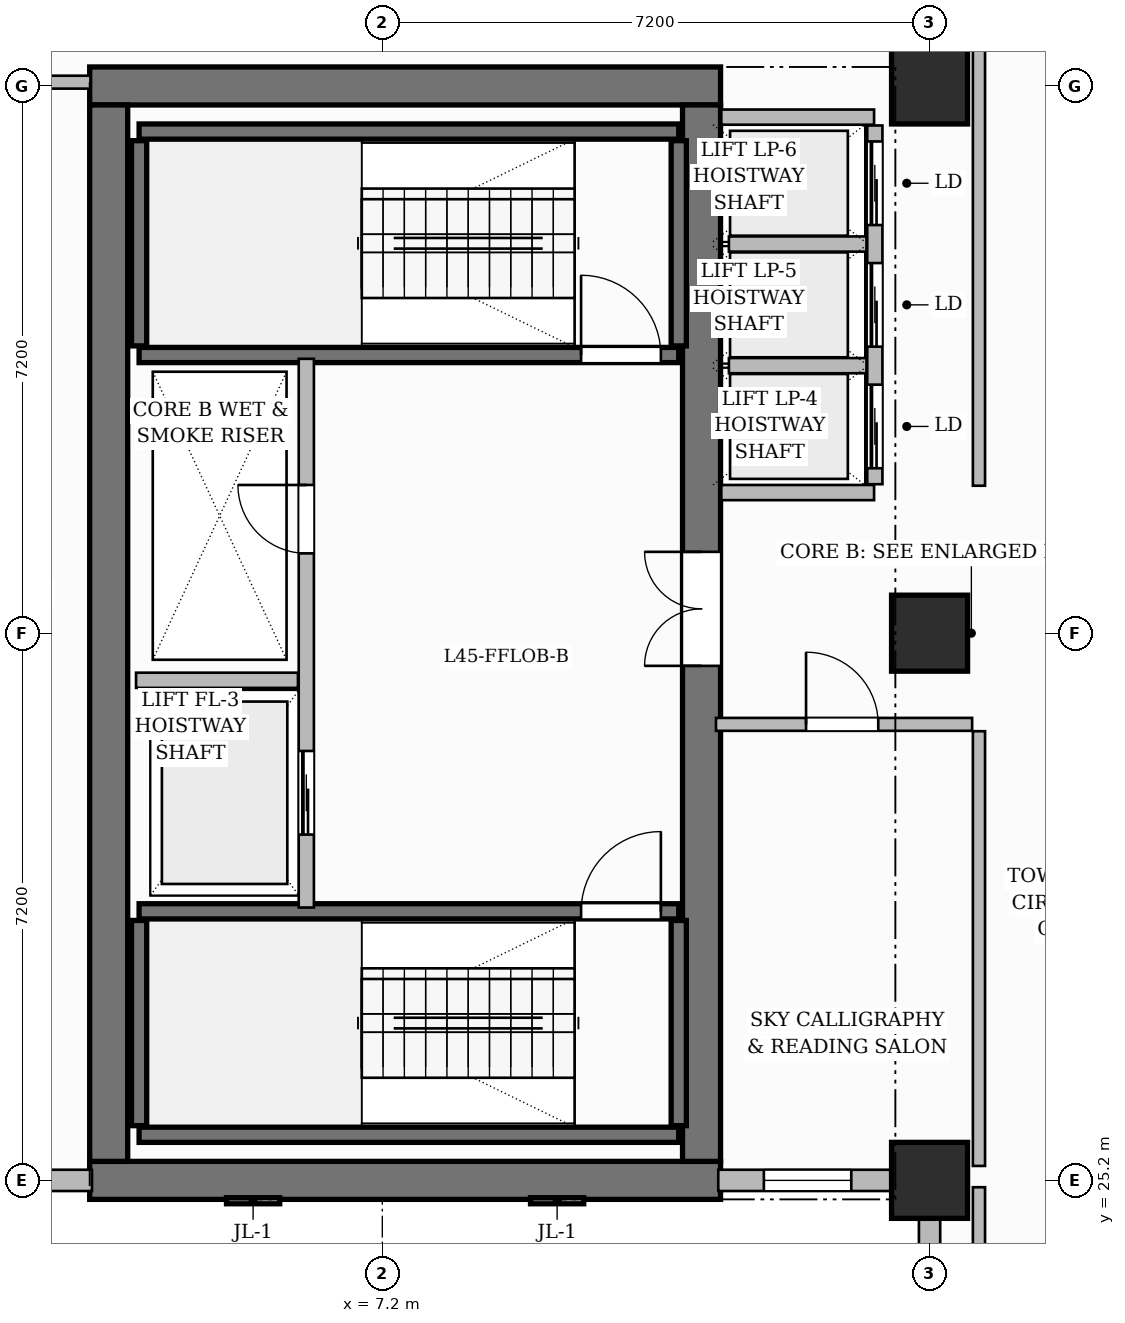
"""IFC4 building model, lengths in metres.
Left out: names, types, materials, properties, quantities, classifications, styles, units other than length and angle.
Written with IfcOpenShell. Run it as: python <this file> out.ifc"""

import sys

from ifc_helpers import new_model, si_unit, direction, frame, frame_2d, origin, origin_2d, place, context, subcontext, project, spatial, rectangle, extrude, source, transform, mapped, element, fill, save


model = new_model("IFC4")
c1 = context("Model", 3, precision=1e-05, world=origin(), true_north=direction((0.0, 1.0)))
c2 = subcontext(c1, "Body", "Model", "MODEL_VIEW")
j1 = project(units=[si_unit("LENGTHUNIT", "METRE"), si_unit("PLANEANGLEUNIT", "RADIAN")], contexts=[c1])
p1 = place(None, origin())
s1 = spatial("IfcSite", under=j1, at=p1, CompositionType="ELEMENT")
p2 = place(p1, origin())
s2 = spatial("IfcBuilding", under=s1, at=p2, CompositionType="ELEMENT")
p3 = place(p2, frame((0.0, 0.0, 181.1)))
s3 = spatial("IfcBuildingStorey", under=s2, at=p3, CompositionType="ELEMENT", Elevation=181.1)
for number, where, z_axis, x_axis in (
    (1, (3.35, 25.2, 0.0), (0.0, 0.0, 1.0), (1.0, 0.0, 0.0)),
    (2, (3.35, 39.6, 0.0), (0.0, 0.0, 1.0), (1.0, 0.0, 0.0)),
):
    element("IfcWall", number, at=place(p3, frame(where, z_axis=z_axis, x_axis=x_axis)), inside=s3, PredefinedType="SHEAR", context=c2, shape_type="SweptSolid", body=[
        extrude(rectangle(XDim=8.3, YDim=0.5, at=frame_2d((4.15, 0.0))), origin(), (0.0, 0.0, 1.0), 3.85),
    ])
p4 = place(p3, frame((3.6, 25.45, 0.0), z_axis=(0.0, 0.0, 1.0), x_axis=(0.0, 1.0, 0.0)))
e3 = element("IfcWall", 3, at=p4, inside=s3, PredefinedType="SHEAR", context=c2, shape_type="SweptSolid", body=[
    extrude(rectangle(XDim=13.9, YDim=0.5, at=frame_2d((6.95, 0.0))), origin(), (0.0, 0.0, 1.0), 3.85),
])
p5 = place(p3, frame((11.4, 25.45, 0.0), z_axis=(0.0, 0.0, 1.0), x_axis=(0.0, 1.0, 0.0)))
e4 = element("IfcWall", 4, at=p5, inside=s3, PredefinedType="SHEAR", context=c2, shape_type="SweptSolid", body=[
    extrude(rectangle(XDim=13.9, YDim=0.5, at=frame_2d((6.95, 0.0))), origin(), (0.0, 0.0, 1.0), 3.85),
])
p6 = place(p5, frame((6.52, 0.0, 0.0)))
e5 = element("IfcOpeningElement", 5, at=p6, cuts=e4, PredefinedType="OPENING", context=c2, shape_type="SweptSolid", body=[
    extrude(rectangle(XDim=1.5, YDim=2.2, at=frame_2d((0.75, 1.1))), frame((0.0, 0.26, 0.0), z_axis=(0.0, -1.0, 0.0), x_axis=(1.0, 0.0, 0.0)), (0.0, 0.0, 1.0), 0.52),
])
m1 = source(origin(), c2, "Body", "SweptSolid", [
    extrude(rectangle(XDim=1.0, YDim=1.0, at=origin_2d()), origin(), (0.0, 0.0, 1.0), 3.85),
])
for number, where, z_axis, x_axis in (
    (6, (14.4, 25.2, 0.0), (0.0, 0.0, 1.0), (1.0, 0.0, 0.0)),
    (7, (14.4, 32.4, 0.0), (0.0, 0.0, 1.0), (1.0, 0.0, 0.0)),
    (8, (14.4, 39.6, 0.0), (0.0, 0.0, 1.0), (1.0, 0.0, 0.0)),
):
    element("IfcColumn", number, at=place(p3, frame(where, z_axis=z_axis, x_axis=x_axis)), inside=s3, PredefinedType="COLUMN", context=c2, shape_type="MappedRepresentation", body=[
        mapped(m1, transform((0.0, 0.0, 0.0), scale=1.0)),
    ])
p7 = place(p3, frame((4.0, 25.8, 0.0), z_axis=(0.0, 0.0, 1.0), x_axis=(1.0, 0.0, 0.0)))
e9 = element("IfcWall", 9, at=p7, inside=s3, PredefinedType="SHEAR", context=c2, shape_type="SweptSolid", body=[
    extrude(rectangle(XDim=7.1, YDim=0.2, at=frame_2d((3.55, 0.0))), origin(), (0.0, 0.0, 1.0), 3.85),
])
for number, where, z_axis, x_axis in (
    (10, (4.0, 25.92, 0.0), (0.0, 0.0, 1.0), (0.0, 1.0, 0.0)),
    (11, (11.1, 25.92, 0.0), (0.0, 0.0, 1.0), (0.0, 1.0, 0.0)),
):
    element("IfcWall", number, at=place(p3, frame(where, z_axis=z_axis, x_axis=x_axis)), inside=s3, PredefinedType="SHEAR", context=c2, shape_type="SweptSolid", body=[
        extrude(rectangle(XDim=2.7, YDim=0.2, at=frame_2d((1.35, 0.0))), origin(), (0.0, 0.0, 1.0), 3.85),
    ])
p8 = place(p3, frame((4.0, 28.74, 0.0), z_axis=(0.0, 0.0, 1.0), x_axis=(1.0, 0.0, 0.0)))
e12 = element("IfcWall", 12, at=p8, inside=s3, PredefinedType="SHEAR", context=c2, shape_type="SweptSolid", body=[
    extrude(rectangle(XDim=7.1, YDim=0.2, at=frame_2d((3.55, 0.0))), origin(), (0.0, 0.0, 1.0), 3.85),
])
p9 = place(p8, frame((5.815, 0.0, 0.0)))
e13 = element("IfcOpeningElement", 13, at=p9, cuts=e12, PredefinedType="OPENING", context=c2, shape_type="SweptSolid", body=[
    extrude(rectangle(XDim=1.05, YDim=2.2, at=frame_2d((0.525, 1.1))), frame((0.0, 0.11, 0.0), z_axis=(0.0, -1.0, 0.0), x_axis=(1.0, 0.0, 0.0)), (0.0, 0.0, 1.0), 0.22),
])
p10 = place(p3, frame((4.0, 39.0, 0.0), z_axis=(0.0, 0.0, 1.0), x_axis=(1.0, 0.0, 0.0)))
e14 = element("IfcWall", 14, at=p10, inside=s3, PredefinedType="SHEAR", context=c2, shape_type="SweptSolid", body=[
    extrude(rectangle(XDim=7.1, YDim=0.2, at=frame_2d((3.55, 0.0))), origin(), (0.0, 0.0, 1.0), 3.85),
])
for number, where, z_axis, x_axis in (
    (15, (4.0, 36.18, 0.0), (0.0, 0.0, 1.0), (0.0, 1.0, 0.0)),
    (16, (11.1, 36.18, 0.0), (0.0, 0.0, 1.0), (0.0, 1.0, 0.0)),
):
    element("IfcWall", number, at=place(p3, frame(where, z_axis=z_axis, x_axis=x_axis)), inside=s3, PredefinedType="SHEAR", context=c2, shape_type="SweptSolid", body=[
        extrude(rectangle(XDim=2.7, YDim=0.2, at=frame_2d((1.35, 0.0))), origin(), (0.0, 0.0, 1.0), 3.85),
    ])
p11 = place(p3, frame((4.0, 36.06, 0.0), z_axis=(0.0, 0.0, 1.0), x_axis=(1.0, 0.0, 0.0)))
e17 = element("IfcWall", 17, at=p11, inside=s3, PredefinedType="SHEAR", context=c2, shape_type="SweptSolid", body=[
    extrude(rectangle(XDim=7.1, YDim=0.2, at=frame_2d((3.55, 0.0))), origin(), (0.0, 0.0, 1.0), 3.85),
])
p12 = place(p11, frame((5.815, 0.0, 0.0)))
e18 = element("IfcOpeningElement", 18, at=p12, cuts=e17, PredefinedType="OPENING", context=c2, shape_type="SweptSolid", body=[
    extrude(rectangle(XDim=1.05, YDim=2.2, at=frame_2d((0.525, 1.1))), frame((0.0, 0.11, 0.0), z_axis=(0.0, -1.0, 0.0), x_axis=(1.0, 0.0, 0.0)), (0.0, 0.0, 1.0), 0.22),
])
p13 = place(p3, frame((6.2, 28.79, 0.0), z_axis=(0.0, 0.0, 1.0), x_axis=(0.0, 1.0, 0.0)))
e19 = element("IfcWall", 19, at=p13, inside=s3, PredefinedType="PARTITIONING", context=c2, shape_type="SweptSolid", body=[
    extrude(rectangle(XDim=7.22, YDim=0.2, at=frame_2d((3.61, 0.0))), origin(), (0.0, 0.0, 1.0), 3.6),
])
p14 = place(p13, frame((4.66, 0.0, 0.0)))
e20 = element("IfcOpeningElement", 20, at=p14, cuts=e19, PredefinedType="OPENING", context=c2, shape_type="SweptSolid", body=[
    extrude(rectangle(XDim=0.9, YDim=2.1, at=frame_2d((0.45, 1.05))), frame((0.0, 0.11, 0.0), z_axis=(0.0, -1.0, 0.0), x_axis=(1.0, 0.0, 0.0)), (0.0, 0.0, 1.0), 0.22),
])
p15 = place(p13, frame((0.96, 0.0, 0.0)))
e21 = element("IfcOpeningElement", 21, at=p15, cuts=e19, PredefinedType="OPENING", context=c2, shape_type="SweptSolid", body=[
    extrude(rectangle(XDim=1.1, YDim=2.2, at=frame_2d((0.55, 1.1))), frame((0.0, 0.11, 0.0), z_axis=(0.0, -1.0, 0.0), x_axis=(1.0, 0.0, 0.0)), (0.0, 0.0, 1.0), 0.22),
])
p16 = place(p3, frame((3.96, 31.78, 0.0), z_axis=(0.0, 0.0, 1.0), x_axis=(1.0, 0.0, 0.0)))
e22 = element("IfcWall", 22, at=p16, inside=s3, PredefinedType="PARTITIONING", context=c2, shape_type="SweptSolid", body=[
    extrude(rectangle(XDim=2.13, YDim=0.2, at=frame_2d((1.065, 0.0))), origin(), (0.0, 0.0, 1.0), 3.6),
])
for number, where, z_axis, x_axis in (
    (23, (11.66, 34.25, 0.0), (0.0, 0.0, 1.0), (1.0, 0.0, 0.0)),
    (24, (11.66, 39.19, 0.0), (0.0, 0.0, 1.0), (1.0, 0.0, 0.0)),
):
    element("IfcWall", number, at=place(p3, frame(where, z_axis=z_axis, x_axis=x_axis)), inside=s3, PredefinedType="PARTITIONING", context=c2, shape_type="SweptSolid", body=[
        extrude(rectangle(XDim=2.01, YDim=0.2, at=frame_2d((1.005, 0.0))), origin(), (0.0, 0.0, 1.0), 3.6),
    ])
p17 = place(p3, frame((13.68, 34.36, 0.0), z_axis=(0.0, 0.0, 1.0), x_axis=(0.0, 1.0, 0.0)))
e25 = element("IfcWall", 25, at=p17, inside=s3, PredefinedType="PARTITIONING", context=c2, shape_type="SweptSolid", body=[
    extrude(rectangle(XDim=4.72, YDim=0.2, at=frame_2d((2.36, 0.0))), origin(), (0.0, 0.0, 1.0), 3.6),
])
p18 = place(p17, frame((0.21, 0.0, 0.0)))
e26 = element("IfcOpeningElement", 26, at=p18, cuts=e25, PredefinedType="OPENING", context=c2, shape_type="SweptSolid", body=[
    extrude(rectangle(XDim=1.1, YDim=2.2, at=frame_2d((0.55, 1.1))), frame((0.0, 0.11, 0.0), z_axis=(0.0, -1.0, 0.0), x_axis=(1.0, 0.0, 0.0)), (0.0, 0.0, 1.0), 0.22),
])
p19 = place(p17, frame((1.81, 0.0, 0.0)))
e27 = element("IfcOpeningElement", 27, at=p19, cuts=e25, PredefinedType="OPENING", context=c2, shape_type="SweptSolid", body=[
    extrude(rectangle(XDim=1.1, YDim=2.2, at=frame_2d((0.55, 1.1))), frame((0.0, 0.11, 0.0), z_axis=(0.0, -1.0, 0.0), x_axis=(1.0, 0.0, 0.0)), (0.0, 0.0, 1.0), 0.22),
])
p20 = place(p17, frame((3.41, 0.0, 0.0)))
e28 = element("IfcOpeningElement", 28, at=p20, cuts=e25, PredefinedType="OPENING", context=c2, shape_type="SweptSolid", body=[
    extrude(rectangle(XDim=1.1, YDim=2.2, at=frame_2d((0.55, 1.1))), frame((0.0, 0.11, 0.0), z_axis=(0.0, -1.0, 0.0), x_axis=(1.0, 0.0, 0.0)), (0.0, 0.0, 1.0), 0.22),
])
for number, where, z_axis, x_axis in (
    (29, (11.76, 35.92, 0.0), (0.0, 0.0, 1.0), (1.0, 0.0, 0.0)),
    (30, (11.76, 37.52, 0.0), (0.0, 0.0, 1.0), (1.0, 0.0, 0.0)),
):
    element("IfcWall", number, at=place(p3, frame(where, z_axis=z_axis, x_axis=x_axis)), inside=s3, PredefinedType="PARTITIONING", context=c2, shape_type="SweptSolid", body=[
        extrude(rectangle(XDim=1.81, YDim=0.2, at=frame_2d((0.905, 0.0))), origin(), (0.0, 0.0, 1.0), 3.6),
    ])
p21 = place(p3, frame((15.05, 12.36, 0.0), z_axis=(0.0, 0.0, 1.0), x_axis=(0.0, 1.0, 0.0)))
e31 = element("IfcWall", 31, at=p21, inside=s3, PredefinedType="PARTITIONING", context=c2, shape_type="SweptSolid", body=[
    extrude(rectangle(XDim=12.75, YDim=0.16, at=frame_2d((6.375, 0.0))), origin(), (0.0, 0.0, 1.0), 3.6),
])
p22 = place(p3, frame((0.24, 39.65, 0.0), z_axis=(0.0, 0.0, 1.0), x_axis=(1.0, 0.0, 0.0)))
e32 = element("IfcWall", 32, at=p22, inside=s3, PredefinedType="PARTITIONING", context=c2, shape_type="SweptSolid", body=[
    extrude(rectangle(XDim=3.12, YDim=0.17, at=frame_2d((1.56, 0.0))), origin(), (0.0, 0.0, 1.0), 3.6),
])
p23 = place(p22, frame((1.11, 0.0, 0.0)))
e33 = element("IfcOpeningElement", 33, at=p23, cuts=e32, PredefinedType="OPENING", context=c2, shape_type="SweptSolid", body=[
    extrude(rectangle(XDim=0.9, YDim=2.15, at=frame_2d((0.45, 1.075))), frame((0.0, 0.095, 0.0), z_axis=(0.0, -1.0, 0.0), x_axis=(1.0, 0.0, 0.0)), (0.0, 0.0, 1.0), 0.19),
])
p24 = place(p3, frame((15.05, 34.34, 0.0), z_axis=(0.0, 0.0, 1.0), x_axis=(0.0, 1.0, 0.0)))
e34 = element("IfcWall", 34, at=p24, inside=s3, PredefinedType="PARTITIONING", context=c2, shape_type="SweptSolid", body=[
    extrude(rectangle(XDim=12.312, YDim=0.16, at=frame_2d((6.156, 0.0))), origin(), (0.0, 0.0, 1.0), 3.6),
])
p25 = place(p24, frame((8.01, 0.0, 0.0)))
e35 = element("IfcOpeningElement", 35, at=p25, cuts=e34, PredefinedType="OPENING", context=c2, shape_type="SweptSolid", body=[
    extrude(rectangle(XDim=1.6, YDim=2.4, at=frame_2d((0.8, 1.2))), frame((0.0, 0.09, 0.0), z_axis=(0.0, -1.0, 0.0), x_axis=(1.0, 0.0, 0.0)), (0.0, 0.0, 1.0), 0.18),
])
p26 = place(p3, frame((15.05, 25.39, 0.0), z_axis=(0.0, 0.0, 1.0), x_axis=(0.0, 1.0, 0.0)))
e36 = element("IfcWall", 36, at=p26, inside=s3, PredefinedType="PARTITIONING", context=c2, shape_type="SweptSolid", body=[
    extrude(rectangle(XDim=5.72, YDim=0.16, at=frame_2d((2.86, 0.0))), origin(), (0.0, 0.0, 1.0), 3.6),
])
p27 = place(p3, frame((11.59, 31.2, 0.0), z_axis=(0.0, 0.0, 1.0), x_axis=(1.0, 0.0, 0.0)))
e37 = element("IfcWall", 37, at=p27, inside=s3, PredefinedType="PARTITIONING", context=c2, shape_type="SweptSolid", body=[
    extrude(rectangle(XDim=3.37, YDim=0.17, at=frame_2d((1.685, 0.0))), origin(), (0.0, 0.0, 1.0), 3.6),
])
p28 = place(p27, frame((1.185, 0.0, 0.0)))
e38 = element("IfcOpeningElement", 38, at=p28, cuts=e37, PredefinedType="OPENING", context=c2, shape_type="SweptSolid", body=[
    extrude(rectangle(XDim=0.95, YDim=2.15, at=frame_2d((0.475, 1.075))), frame((0.0, 0.095, 0.0), z_axis=(0.0, -1.0, 0.0), x_axis=(1.0, 0.0, 0.0)), (0.0, 0.0, 1.0), 0.19),
])
p29 = place(p3, frame((14.4, 0.05, 0.0), z_axis=(0.0, 0.0, 1.0), x_axis=(0.0, 1.0, 0.0)))
e39 = element("IfcWall", 39, at=p29, inside=s3, PredefinedType="SOLIDWALL", context=c2, shape_type="SweptSolid", body=[
    extrude(rectangle(XDim=25.1, YDim=0.28, at=frame_2d((12.55, 0.0))), origin(), (0.0, 0.0, 1.0), 3.085),
])
p30 = place(p29, frame((2.75, 0.0, 0.0)))
e40 = element("IfcOpeningElement", 40, at=p30, cuts=e39, PredefinedType="OPENING", context=c2, shape_type="SweptSolid", body=[
    extrude(rectangle(XDim=1.2, YDim=2.2, at=frame_2d((0.6, 1.1))), frame((0.0, 0.15, 0.0), z_axis=(0.0, -1.0, 0.0), x_axis=(1.0, 0.0, 0.0)), (0.0, 0.0, 1.0), 0.3),
])
p31 = place(p29, frame((1.025, 0.0, 0.8)))
e41 = element("IfcOpeningElement", 41, at=p31, cuts=e39, PredefinedType="OPENING", context=c2, shape_type="SweptSolid", body=[
    extrude(rectangle(XDim=1.15, YDim=1.8, at=frame_2d((0.575, 0.9))), frame((0.0, 0.15, 0.0), z_axis=(0.0, -1.0, 0.0), x_axis=(1.0, 0.0, 0.0)), (0.0, 0.0, 1.0), 0.3),
])
p32 = place(p29, frame((4.6, 0.0, 0.8)))
e42 = element("IfcOpeningElement", 42, at=p32, cuts=e39, PredefinedType="OPENING", context=c2, shape_type="SweptSolid", body=[
    extrude(rectangle(XDim=1.4, YDim=1.85, at=frame_2d((0.7, 0.925))), frame((0.0, 0.15, 0.0), z_axis=(0.0, -1.0, 0.0), x_axis=(1.0, 0.0, 0.0)), (0.0, 0.0, 1.0), 0.3),
])
p33 = place(p29, frame((8.421, 0.0, 0.8)))
e43 = element("IfcOpeningElement", 43, at=p33, cuts=e39, PredefinedType="OPENING", context=c2, shape_type="SweptSolid", body=[
    extrude(rectangle(XDim=1.4, YDim=1.85, at=frame_2d((0.7, 0.925))), frame((0.0, 0.15, 0.0), z_axis=(0.0, -1.0, 0.0), x_axis=(1.0, 0.0, 0.0)), (0.0, 0.0, 1.0), 0.3),
])
p34 = place(p29, frame((10.685, 0.0, 0.8)))
e44 = element("IfcOpeningElement", 44, at=p34, cuts=e39, PredefinedType="OPENING", context=c2, shape_type="SweptSolid", body=[
    extrude(rectangle(XDim=1.15, YDim=1.8, at=frame_2d((0.575, 0.9))), frame((0.0, 0.15, 0.0), z_axis=(0.0, -1.0, 0.0), x_axis=(1.0, 0.0, 0.0)), (0.0, 0.0, 1.0), 0.3),
])
p35 = place(p29, frame((12.414, 0.0, 0.8)))
e45 = element("IfcOpeningElement", 45, at=p35, cuts=e39, PredefinedType="OPENING", context=c2, shape_type="SweptSolid", body=[
    extrude(rectangle(XDim=0.95, YDim=1.75, at=frame_2d((0.475, 0.875))), frame((0.0, 0.15, 0.0), z_axis=(0.0, -1.0, 0.0), x_axis=(1.0, 0.0, 0.0)), (0.0, 0.0, 1.0), 0.3),
])
p36 = place(p29, frame((15.675, 0.0, 0.8)))
e46 = element("IfcOpeningElement", 46, at=p36, cuts=e39, PredefinedType="OPENING", context=c2, shape_type="SweptSolid", body=[
    extrude(rectangle(XDim=1.8, YDim=1.85, at=frame_2d((0.9, 0.925))), frame((0.0, 0.15, 0.0), z_axis=(0.0, -1.0, 0.0), x_axis=(1.0, 0.0, 0.0)), (0.0, 0.0, 1.0), 0.3),
])
p37 = place(p29, frame((18.425, 0.0, 0.8)))
e47 = element("IfcOpeningElement", 47, at=p37, cuts=e39, PredefinedType="OPENING", context=c2, shape_type="SweptSolid", body=[
    extrude(rectangle(XDim=1.8, YDim=1.85, at=frame_2d((0.9, 0.925))), frame((0.0, 0.15, 0.0), z_axis=(0.0, -1.0, 0.0), x_axis=(1.0, 0.0, 0.0)), (0.0, 0.0, 1.0), 0.3),
])
p38 = place(p29, frame((22.65, 0.0, 0.8)))
e48 = element("IfcOpeningElement", 48, at=p38, cuts=e39, PredefinedType="OPENING", context=c2, shape_type="SweptSolid", body=[
    extrude(rectangle(XDim=1.4, YDim=1.85, at=frame_2d((0.7, 0.925))), frame((0.0, 0.15, 0.0), z_axis=(0.0, -1.0, 0.0), x_axis=(1.0, 0.0, 0.0)), (0.0, 0.0, 1.0), 0.3),
])
p39 = place(p3, frame((11.62, 25.2, 0.0), z_axis=(0.0, 0.0, 1.0), x_axis=(1.0, 0.0, 0.0)))
e49 = element("IfcWall", 49, at=p39, inside=s3, PredefinedType="SOLIDWALL", context=c2, shape_type="SweptSolid", body=[
    extrude(rectangle(XDim=2.78, YDim=0.28, at=frame_2d((1.39, 0.0))), origin(), (0.0, 0.0, 1.0), 3.085),
])
p40 = place(p39, frame((0.6, 0.0, 0.8)))
e50 = element("IfcOpeningElement", 50, at=p40, cuts=e49, PredefinedType="OPENING", context=c2, shape_type="SweptSolid", body=[
    extrude(rectangle(XDim=1.15, YDim=1.8, at=frame_2d((0.575, 0.9))), frame((0.0, 0.15, 0.0), z_axis=(0.0, -1.0, 0.0), x_axis=(1.0, 0.0, 0.0)), (0.0, 0.0, 1.0), 0.3),
])
p41 = place(p3, frame((0.0, 25.2, 0.0), z_axis=(0.0, 0.0, 1.0), x_axis=(1.0, 0.0, 0.0)))
e51 = element("IfcWall", 51, at=p41, inside=s3, PredefinedType="SOLIDWALL", context=c2, shape_type="SweptSolid", body=[
    extrude(rectangle(XDim=3.38, YDim=0.28, at=frame_2d((1.69, 0.0))), origin(), (0.0, 0.0, 1.0), 3.6),
])
p42 = place(p41, frame((1.205, 0.0, 0.8)))
e52 = element("IfcOpeningElement", 52, at=p42, cuts=e51, PredefinedType="OPENING", context=c2, shape_type="SweptSolid", body=[
    extrude(rectangle(XDim=1.4, YDim=1.85, at=frame_2d((0.7, 0.925))), frame((0.0, 0.15, 0.0), z_axis=(0.0, -1.0, 0.0), x_axis=(1.0, 0.0, 0.0)), (0.0, 0.0, 1.0), 0.3),
])
m2 = source(origin(), c2, "Body", "SweptSolid", [
    extrude(rectangle(XDim=1.05, YDim=2.2, at=frame_2d((0.525, 1.1))), frame((0.0, 0.025, 0.0), z_axis=(0.0, -1.0, 0.0), x_axis=(1.0, 0.0, 0.0)), (0.0, 0.0, 1.0), 0.05),
])
p43 = place(p9, origin())
e53 = element("IfcDoor", 53, at=p43, inside=s3, OperationType="SINGLE_SWING_RIGHT", PredefinedType="DOOR", context=c2, shape_type="MappedRepresentation", body=[
    mapped(m2, transform((0.0, 0.0, 0.0), scale=1.0)),
])
fill(e13, e53)
p44 = place(p12, origin())
e54 = element("IfcDoor", 54, at=p44, inside=s3, OperationType="SINGLE_SWING_LEFT", PredefinedType="DOOR", context=c2, shape_type="MappedRepresentation", body=[
    mapped(m2, transform((0.0, 0.0, 0.0), scale=1.0)),
])
fill(e18, e54)
m3 = source(origin(), c2, "Body", "SweptSolid", [
    extrude(rectangle(XDim=0.9, YDim=2.1, at=frame_2d((0.45, 1.05))), frame((0.0, 0.025, 0.0), z_axis=(0.0, -1.0, 0.0), x_axis=(1.0, 0.0, 0.0)), (0.0, 0.0, 1.0), 0.05),
])
p45 = place(p14, origin())
e55 = element("IfcDoor", 55, at=p45, inside=s3, OperationType="SINGLE_SWING_RIGHT", PredefinedType="DOOR", context=c2, shape_type="MappedRepresentation", body=[
    mapped(m3, transform((0.0, 0.0, 0.0), scale=1.0)),
])
fill(e20, e55)
m4 = source(origin(), c2, "Body", "SweptSolid", [
    extrude(rectangle(XDim=1.5, YDim=2.2, at=frame_2d((0.75, 1.1))), frame((0.0, 0.025, 0.0), z_axis=(0.0, -1.0, 0.0), x_axis=(1.0, 0.0, 0.0)), (0.0, 0.0, 1.0), 0.05),
])
p46 = place(p6, origin())
e56 = element("IfcDoor", 56, at=p46, inside=s3, OperationType="DOUBLE_DOOR_SINGLE_SWING", PredefinedType="DOOR", context=c2, shape_type="MappedRepresentation", body=[
    mapped(m4, transform((0.0, 0.0, 0.0), scale=1.0)),
])
fill(e5, e56)
m5 = source(origin(), c2, "Body", "SweptSolid", [
    extrude(rectangle(XDim=0.95, YDim=2.15, at=frame_2d((0.475, 1.075))), frame((0.0, 0.025, 0.0), z_axis=(0.0, -1.0, 0.0), x_axis=(1.0, 0.0, 0.0)), (0.0, 0.0, 1.0), 0.05),
])
p47 = place(p28, origin())
e57 = element("IfcDoor", 57, at=p47, inside=s3, OperationType="SINGLE_SWING_LEFT", PredefinedType="DOOR", context=c2, shape_type="MappedRepresentation", body=[
    mapped(m5, transform((0.0, 0.0, 0.0), scale=1.0)),
])
fill(e38, e57)
m6 = source(origin(), c2, "Body", "SweptSolid", [
    extrude(rectangle(XDim=1.1, YDim=2.2, at=frame_2d((0.55, 1.1))), frame((0.0, 0.025, 0.0), z_axis=(0.0, -1.0, 0.0), x_axis=(1.0, 0.0, 0.0)), (0.0, 0.0, 1.0), 0.05),
])
p48 = place(p15, origin())
e58 = element("IfcDoor", 58, at=p48, inside=s3, OperationType="SLIDING_TO_LEFT", PredefinedType="DOOR", context=c2, shape_type="MappedRepresentation", body=[
    mapped(m6, transform((0.0, 0.0, 0.0), scale=1.0)),
])
fill(e21, e58)
p49 = place(p18, origin())
e59 = element("IfcDoor", 59, at=p49, inside=s3, OperationType="SLIDING_TO_LEFT", PredefinedType="DOOR", context=c2, shape_type="MappedRepresentation", body=[
    mapped(m6, transform((0.0, 0.0, 0.0), scale=1.0)),
])
fill(e26, e59)
p50 = place(p19, origin())
e60 = element("IfcDoor", 60, at=p50, inside=s3, OperationType="SLIDING_TO_LEFT", PredefinedType="DOOR", context=c2, shape_type="MappedRepresentation", body=[
    mapped(m6, transform((0.0, 0.0, 0.0), scale=1.0)),
])
fill(e27, e60)
p51 = place(p20, origin())
e61 = element("IfcDoor", 61, at=p51, inside=s3, OperationType="SLIDING_TO_LEFT", PredefinedType="DOOR", context=c2, shape_type="MappedRepresentation", body=[
    mapped(m6, transform((0.0, 0.0, 0.0), scale=1.0)),
])
fill(e28, e61)
m7 = source(origin(), c2, "Body", "SweptSolid", [
    extrude(rectangle(XDim=1.15, YDim=1.8, at=frame_2d((0.575, 0.9))), frame((0.0, 0.03, 0.0), z_axis=(0.0, -1.0, 0.0), x_axis=(1.0, 0.0, 0.0)), (0.0, 0.0, 1.0), 0.06),
])
p52 = place(p40, origin())
e62 = element("IfcWindow", 62, at=p52, inside=s3, PartitioningType="SINGLE_PANEL", PredefinedType="WINDOW", context=c2, shape_type="MappedRepresentation", body=[
    mapped(m7, transform((0.0, 0.0, 0.0), scale=1.0)),
])
fill(e50, e62)
save(model, sys.argv[1])
